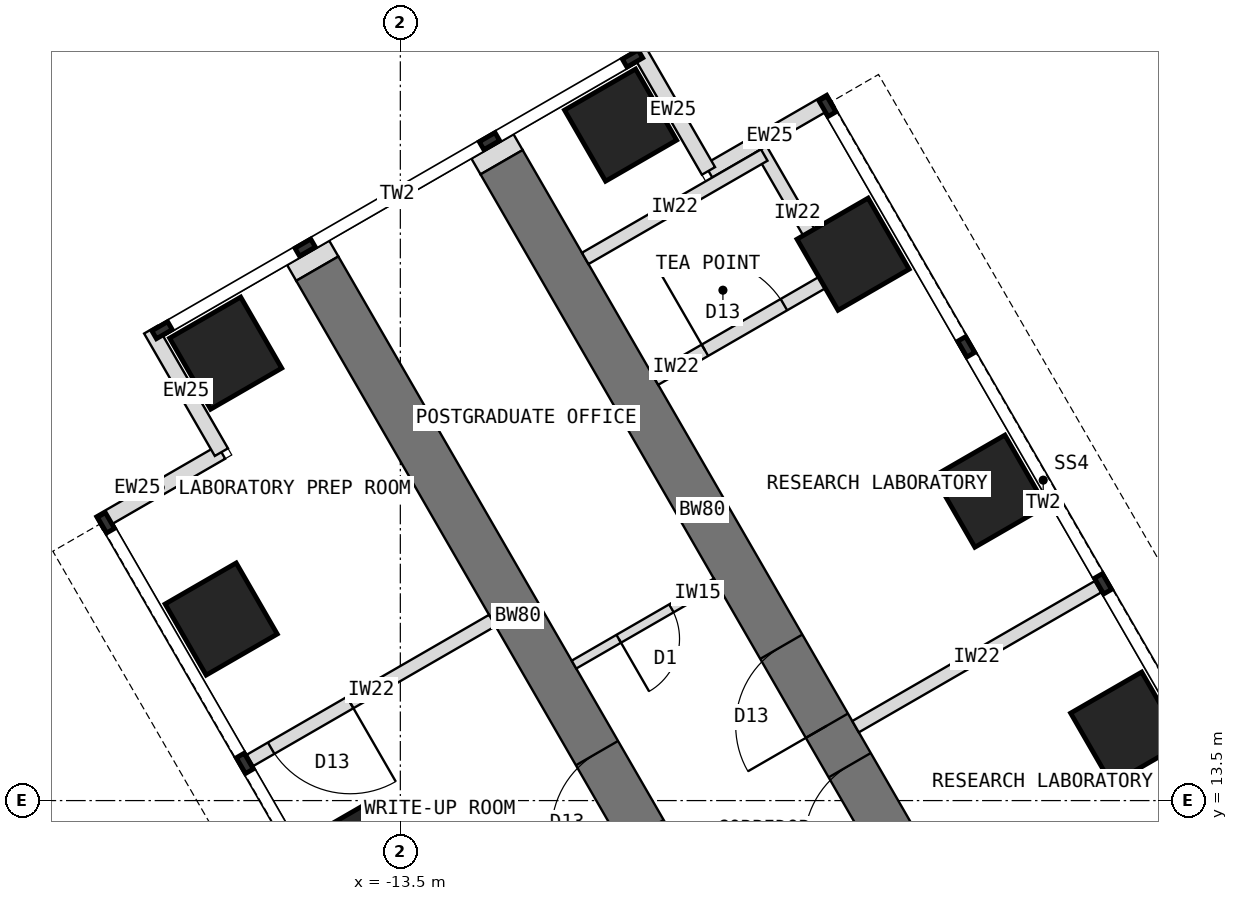
"""IFC4 building model, lengths in metres.
Left out: names, types, materials, properties, quantities, classifications, styles, units other than length and angle.
Written with IfcOpenShell. Run it as: python <this file> out.ifc"""

import sys

from ifc_helpers import new_model, si_unit, direction, frame, frame_2d, origin, origin_2d, place, context, subcontext, project, spatial, rectangle, extrude, element, fill, save


model = new_model("IFC4")
c1 = context("Model", 3, precision=1e-05, world=origin(), true_north=direction((0.0, 1.0)))
c2 = subcontext(c1, "Body", "Model", "MODEL_VIEW")
j1 = project(units=[si_unit("LENGTHUNIT", "METRE"), si_unit("PLANEANGLEUNIT", "RADIAN")], contexts=[c1])
p1 = place(None, origin())
s1 = spatial("IfcSite", under=j1, at=p1, CompositionType="ELEMENT")
p2 = place(p1, origin())
s2 = spatial("IfcBuilding", under=s1, at=p2, CompositionType="ELEMENT")
p3 = place(p2, frame((0.0, 0.0, 113.5)))
s3 = spatial("IfcBuildingStorey", under=s2, at=p3, CompositionType="ELEMENT", Elevation=113.5)
p4 = place(p3, frame((-8.266, 10.816, 0.0), z_axis=(0.0, 0.0, 1.0), x_axis=(-0.499996231654, 0.866027579429, 0.0)))
e1 = element("IfcWall", 1, at=p4, inside=s3, PredefinedType="SHEAR", context=c2, shape_type="SweptSolid", body=[
    extrude(rectangle(XDim=13.2, YDim=0.8, at=frame_2d((6.6, 0.0))), origin(), (0.0, 0.0, 1.0), 4.0),
])
p5 = place(p4, frame((0.25, 0.0, 0.0)))
e2 = element("IfcOpeningElement", 2, at=p5, cuts=e1, PredefinedType="OPENING", context=c2, shape_type="SweptSolid", body=[
    extrude(rectangle(XDim=1.5, YDim=2.1, at=frame_2d((0.75, 1.05))), frame((0.0, 0.41, 0.0), z_axis=(0.0, -1.0, 0.0), x_axis=(1.0, 0.0, 0.0)), (0.0, 0.0, 1.0), 0.82),
])
p6 = place(p4, frame((2.5, 0.0, 0.0)))
e3 = element("IfcOpeningElement", 3, at=p6, cuts=e1, PredefinedType="OPENING", context=c2, shape_type="SweptSolid", body=[
    extrude(rectangle(XDim=1.5, YDim=2.1, at=frame_2d((0.75, 1.05))), frame((0.0, 0.41, 0.0), z_axis=(0.0, -1.0, 0.0), x_axis=(1.0, 0.0, 0.0)), (0.0, 0.0, 1.0), 0.82),
])
p7 = place(p3, frame((-5.234, 12.566, 0.0), z_axis=(0.0, 0.0, 1.0), x_axis=(-0.500010103361, 0.866019570528, 0.0)))
e4 = element("IfcWall", 4, at=p7, inside=s3, PredefinedType="SHEAR", context=c2, shape_type="SweptSolid", body=[
    extrude(rectangle(XDim=13.2, YDim=0.8, at=frame_2d((6.6, 0.0))), origin(), (0.0, 0.0, 1.0), 4.0),
])
p8 = place(p7, frame((0.25, 0.0, 0.0)))
e5 = element("IfcOpeningElement", 5, at=p8, cuts=e4, PredefinedType="OPENING", context=c2, shape_type="SweptSolid", body=[
    extrude(rectangle(XDim=1.5, YDim=2.1, at=frame_2d((0.75, 1.05))), frame((0.0, 0.41, 0.0), z_axis=(0.0, -1.0, 0.0), x_axis=(1.0, 0.0, 0.0)), (0.0, 0.0, 1.0), 0.82),
])
p9 = place(p7, frame((2.5, 0.0, 0.0)))
e6 = element("IfcOpeningElement", 6, at=p9, cuts=e4, PredefinedType="OPENING", context=c2, shape_type="SweptSolid", body=[
    extrude(rectangle(XDim=1.5, YDim=2.1, at=frame_2d((0.75, 1.05))), frame((0.0, 0.41, 0.0), z_axis=(0.0, -1.0, 0.0), x_axis=(1.0, 0.0, 0.0)), (0.0, 0.0, 1.0), 0.82),
])
for number, where, z_axis, x_axis in (
    (7, (-1.554, 14.691, 0.0), (0.0, 0.0, 1.0), (0.866, 0.5, 0.0)),
    (8, (-14.196, 12.588, 0.0), (0.0, 0.0, 1.0), (0.866, 0.5, 0.0)),
    (9, (-3.804, 18.588, 0.0), (0.0, 0.0, 1.0), (0.866, 0.5, 0.0)),
    (10, (-16.446, 16.486, 0.0), (0.0, 0.0, 1.0), (0.866, 0.5, 0.0)),
    (11, (-6.054, 22.486, 0.0), (0.0, 0.0, 1.0), (0.866, 0.5, 0.0)),
    (12, (-16.373, 20.858, 0.0), (0.0, 0.0, 1.0), (0.866, 0.5, 0.0)),
    (13, (-9.877, 24.608, 0.0), (0.0, 0.0, 1.0), (0.866, 0.5, 0.0)),
):
    element("IfcColumn", number, at=place(p3, frame(where, z_axis=z_axis, x_axis=x_axis)), inside=s3, PredefinedType="COLUMN", context=c2, shape_type="SweptSolid", body=[
        extrude(rectangle(XDim=1.35, YDim=1.35, at=origin_2d()), origin(), (0.0, 0.0, 1.0), 4.0),
    ])
for number, where, z_axis, x_axis in (
    (14, (-18.456, 18.067, 0.0), (0.0, 0.0, 1.0), (0.866, 0.5, 0.0)),
    (15, (-16.443, 19.23, 0.0), (0.0, 0.0, 1.0), (-0.5, 0.866, 0.0)),
    (16, (-6.419, 25.017, 0.0), (0.0, 0.0, 1.0), (-0.866, -0.5, 0.0)),
    (17, (-8.432, 23.855, 0.0), (0.0, 0.0, 1.0), (-0.5, 0.866, 0.0)),
):
    element("IfcWall", number, at=place(p3, frame(where, z_axis=z_axis, x_axis=x_axis)), inside=s3, PredefinedType="STANDARD", context=c2, shape_type="SweptSolid", body=[
        extrude(rectangle(XDim=2.325, YDim=0.25, at=frame_2d((1.163, 0.0))), origin(), (0.0, 0.0, 1.0), 3.8),
    ])
p10 = place(p3, frame((-14.865, 22.248, 0.0), z_axis=(0.0, 0.0, 1.0), x_axis=(-0.500426713919, 0.865778900179, 0.0)))
e18 = element("IfcWall", 18, at=p10, inside=s3, PredefinedType="PARTITIONING", context=c2, shape_type="SweptSolid", body=[
    extrude(rectangle(XDim=0.3, YDim=0.8, at=frame_2d((0.15, 0.0))), origin(), (0.0, 0.0, 1.0), 3.8),
])
p11 = place(p3, frame((-11.834, 23.998, 0.0), z_axis=(0.0, 0.0, 1.0), x_axis=(-0.499816412211, 0.866131372301, 0.0)))
e19 = element("IfcWall", 19, at=p11, inside=s3, PredefinedType="PARTITIONING", context=c2, shape_type="SweptSolid", body=[
    extrude(rectangle(XDim=0.3, YDim=0.8, at=frame_2d((0.15, 0.0))), origin(), (0.0, 0.0, 1.0), 3.8),
])
p12 = place(p3, frame((-11.987, 16.462, 0.0), z_axis=(0.0, 0.0, 1.0), x_axis=(-0.866039752405, -0.499975146636, 0.0)))
e20 = element("IfcWall", 20, at=p12, inside=s3, PredefinedType="PARTITIONING", context=c2, shape_type="SweptSolid", body=[
    extrude(rectangle(XDim=4.6, YDim=0.215, at=frame_2d((2.3, 0.0))), origin(), (0.0, 0.0, 1.0), 3.8),
])
p13 = place(p12, frame((2.7, 0.0, 0.0)))
e21 = element("IfcOpeningElement", 21, at=p13, cuts=e20, PredefinedType="OPENING", context=c2, shape_type="SweptSolid", body=[
    extrude(rectangle(XDim=1.5, YDim=2.1, at=frame_2d((0.75, 1.05))), frame((0.0, 0.117, 0.0), z_axis=(0.0, -1.0, 0.0), x_axis=(1.0, 0.0, 0.0)), (0.0, 0.0, 1.0), 0.235),
])
p14 = place(p3, frame((-6.013, 14.715, 0.0), z_axis=(0.0, 0.0, 1.0), x_axis=(0.866016770315, 0.500014953309, 0.0)))
e22 = element("IfcWall", 22, at=p14, inside=s3, PredefinedType="PARTITIONING", context=c2, shape_type="SweptSolid", body=[
    extrude(rectangle(XDim=4.6, YDim=0.215, at=frame_2d((2.3, 0.0))), origin(), (0.0, 0.0, 1.0), 3.8),
])
p15 = place(p3, frame((-6.369, 22.131, 0.0), z_axis=(0.0, 0.0, 1.0), x_axis=(-0.499957262057, 0.866050077142, 0.0)))
e23 = element("IfcWall", 23, at=p15, inside=s3, PredefinedType="PARTITIONING", context=c2, shape_type="SweptSolid", body=[
    extrude(rectangle(XDim=2.4, YDim=0.215, at=frame_2d((1.2, 0.0))), origin(), (0.0, 0.0, 1.0), 3.8),
])
p16 = place(p3, frame((-9.313, 20.431, 0.0), z_axis=(0.0, 0.0, 1.0), x_axis=(0.866020560687, 0.500008388397, 0.0)))
e24 = element("IfcWall", 24, at=p16, inside=s3, PredefinedType="PARTITIONING", context=c2, shape_type="SweptSolid", body=[
    extrude(rectangle(XDim=3.4, YDim=0.215, at=frame_2d((1.7, 0.0))), origin(), (0.0, 0.0, 1.0), 3.8),
])
p17 = place(p16, frame((0.95, 0.0, 0.0)))
e25 = element("IfcOpeningElement", 25, at=p17, cuts=e24, PredefinedType="OPENING", context=c2, shape_type="SweptSolid", body=[
    extrude(rectangle(XDim=1.5, YDim=2.1, at=frame_2d((0.75, 1.05))), frame((0.0, 0.117, 0.0), z_axis=(0.0, -1.0, 0.0), x_axis=(1.0, 0.0, 0.0)), (0.0, 0.0, 1.0), 0.235),
])
p18 = place(p3, frame((-10.459, 22.416, 0.0), z_axis=(0.0, 0.0, 1.0), x_axis=(0.866020560687, 0.500008388397, 0.0)))
e26 = element("IfcWall", 26, at=p18, inside=s3, PredefinedType="PARTITIONING", context=c2, shape_type="SweptSolid", body=[
    extrude(rectangle(XDim=3.4, YDim=0.215, at=frame_2d((1.7, 0.0))), origin(), (0.0, 0.0, 1.0), 3.8),
])
p19 = place(p3, frame((-8.306, 17.086, 0.0), z_axis=(0.0, 0.0, 1.0), x_axis=(-0.86599734893, -0.500048589285, 0.0)))
e27 = element("IfcWall", 27, at=p19, inside=s3, PredefinedType="PARTITIONING", context=c2, shape_type="SweptSolid", body=[
    extrude(rectangle(XDim=2.7, YDim=0.15, at=frame_2d((1.35, 0.0))), origin(), (0.0, 0.0, 1.0), 3.8),
])
p20 = place(p19, frame((0.85, 0.0, 0.0)))
e28 = element("IfcOpeningElement", 28, at=p20, cuts=e27, PredefinedType="OPENING", context=c2, shape_type="SweptSolid", body=[
    extrude(rectangle(XDim=1.0, YDim=2.1, at=frame_2d((0.5, 1.05))), frame((0.0, 0.085, 0.0), z_axis=(0.0, -1.0, 0.0), x_axis=(1.0, 0.0, 0.0)), (0.0, 0.0, 1.0), 0.17),
])
p21 = place(p13, origin())
e29 = element("IfcDoor", 29, at=p21, inside=s3, OperationType="DOUBLE_DOOR_SINGLE_SWING", PredefinedType="DOOR", context=c2, shape_type="SweptSolid", body=[
    extrude(rectangle(XDim=1.5, YDim=2.1, at=frame_2d((0.75, 1.05))), frame((0.0, 0.025, 0.0), z_axis=(0.0, -1.0, 0.0), x_axis=(1.0, 0.0, 0.0)), (0.0, 0.0, 1.0), 0.05),
])
fill(e21, e29)
p22 = place(p17, origin())
e30 = element("IfcDoor", 30, at=p22, inside=s3, OperationType="DOUBLE_DOOR_SINGLE_SWING", PredefinedType="DOOR", context=c2, shape_type="SweptSolid", body=[
    extrude(rectangle(XDim=1.5, YDim=2.1, at=frame_2d((0.75, 1.05))), frame((0.0, 0.025, 0.0), z_axis=(0.0, -1.0, 0.0), x_axis=(1.0, 0.0, 0.0)), (0.0, 0.0, 1.0), 0.05),
])
fill(e25, e30)
p23 = place(p20, origin())
e31 = element("IfcDoor", 31, at=p23, inside=s3, OperationType="SINGLE_SWING_RIGHT", PredefinedType="DOOR", context=c2, shape_type="SweptSolid", body=[
    extrude(rectangle(XDim=1.0, YDim=2.1, at=frame_2d((0.5, 1.05))), frame((0.0, 0.025, 0.0), z_axis=(0.0, -1.0, 0.0), x_axis=(1.0, 0.0, 0.0)), (0.0, 0.0, 1.0), 0.05),
])
fill(e28, e31)
p24 = place(p6, origin())
e32 = element("IfcDoor", 32, at=p24, inside=s3, OperationType="DOUBLE_DOOR_SINGLE_SWING", PredefinedType="DOOR", context=c2, shape_type="SweptSolid", body=[
    extrude(rectangle(XDim=1.42, YDim=2.06, at=frame_2d((0.75, 1.03))), frame((0.0, 0.025, 0.0), z_axis=(0.0, -1.0, 0.0), x_axis=(1.0, 0.0, 0.0)), (0.0, 0.0, 1.0), 0.05),
    extrude(rectangle(XDim=0.04, YDim=2.1, at=frame_2d((0.02, 1.05))), frame((0.0, 0.4, 0.0), z_axis=(0.0, -1.0, 0.0), x_axis=(1.0, 0.0, 0.0)), (0.0, 0.0, 1.0), 0.8),
    extrude(rectangle(XDim=0.04, YDim=2.1, at=frame_2d((1.48, 1.05))), frame((0.0, 0.4, 0.0), z_axis=(0.0, -1.0, 0.0), x_axis=(1.0, 0.0, 0.0)), (0.0, 0.0, 1.0), 0.8),
    extrude(rectangle(XDim=1.42, YDim=0.04, at=frame_2d((0.75, 2.08))), frame((0.0, 0.4, 0.0), z_axis=(0.0, -1.0, 0.0), x_axis=(1.0, 0.0, 0.0)), (0.0, 0.0, 1.0), 0.8),
])
fill(e3, e32)
p25 = place(p8, origin())
e33 = element("IfcDoor", 33, at=p25, inside=s3, OperationType="DOUBLE_DOOR_SINGLE_SWING", PredefinedType="DOOR", context=c2, shape_type="SweptSolid", body=[
    extrude(rectangle(XDim=1.42, YDim=2.06, at=frame_2d((0.75, 1.03))), frame((0.0, 0.025, 0.0), z_axis=(0.0, -1.0, 0.0), x_axis=(1.0, 0.0, 0.0)), (0.0, 0.0, 1.0), 0.05),
    extrude(rectangle(XDim=0.04, YDim=2.1, at=frame_2d((0.02, 1.05))), frame((0.0, 0.4, 0.0), z_axis=(0.0, -1.0, 0.0), x_axis=(1.0, 0.0, 0.0)), (0.0, 0.0, 1.0), 0.8),
    extrude(rectangle(XDim=0.04, YDim=2.1, at=frame_2d((1.48, 1.05))), frame((0.0, 0.4, 0.0), z_axis=(0.0, -1.0, 0.0), x_axis=(1.0, 0.0, 0.0)), (0.0, 0.0, 1.0), 0.8),
    extrude(rectangle(XDim=1.42, YDim=0.04, at=frame_2d((0.75, 2.08))), frame((0.0, 0.4, 0.0), z_axis=(0.0, -1.0, 0.0), x_axis=(1.0, 0.0, 0.0)), (0.0, 0.0, 1.0), 0.8),
])
fill(e5, e33)
p26 = place(p9, origin())
e34 = element("IfcDoor", 34, at=p26, inside=s3, OperationType="DOUBLE_DOOR_SINGLE_SWING", PredefinedType="DOOR", context=c2, shape_type="SweptSolid", body=[
    extrude(rectangle(XDim=1.42, YDim=2.06, at=frame_2d((0.75, 1.03))), frame((0.0, 0.025, 0.0), z_axis=(0.0, -1.0, 0.0), x_axis=(1.0, 0.0, 0.0)), (0.0, 0.0, 1.0), 0.05),
    extrude(rectangle(XDim=0.04, YDim=2.1, at=frame_2d((0.02, 1.05))), frame((0.0, 0.4, 0.0), z_axis=(0.0, -1.0, 0.0), x_axis=(1.0, 0.0, 0.0)), (0.0, 0.0, 1.0), 0.8),
    extrude(rectangle(XDim=0.04, YDim=2.1, at=frame_2d((1.48, 1.05))), frame((0.0, 0.4, 0.0), z_axis=(0.0, -1.0, 0.0), x_axis=(1.0, 0.0, 0.0)), (0.0, 0.0, 1.0), 0.8),
    extrude(rectangle(XDim=1.42, YDim=0.04, at=frame_2d((0.75, 2.08))), frame((0.0, 0.4, 0.0), z_axis=(0.0, -1.0, 0.0), x_axis=(1.0, 0.0, 0.0)), (0.0, 0.0, 1.0), 0.8),
])
fill(e6, e34)
save(model, sys.argv[1])
